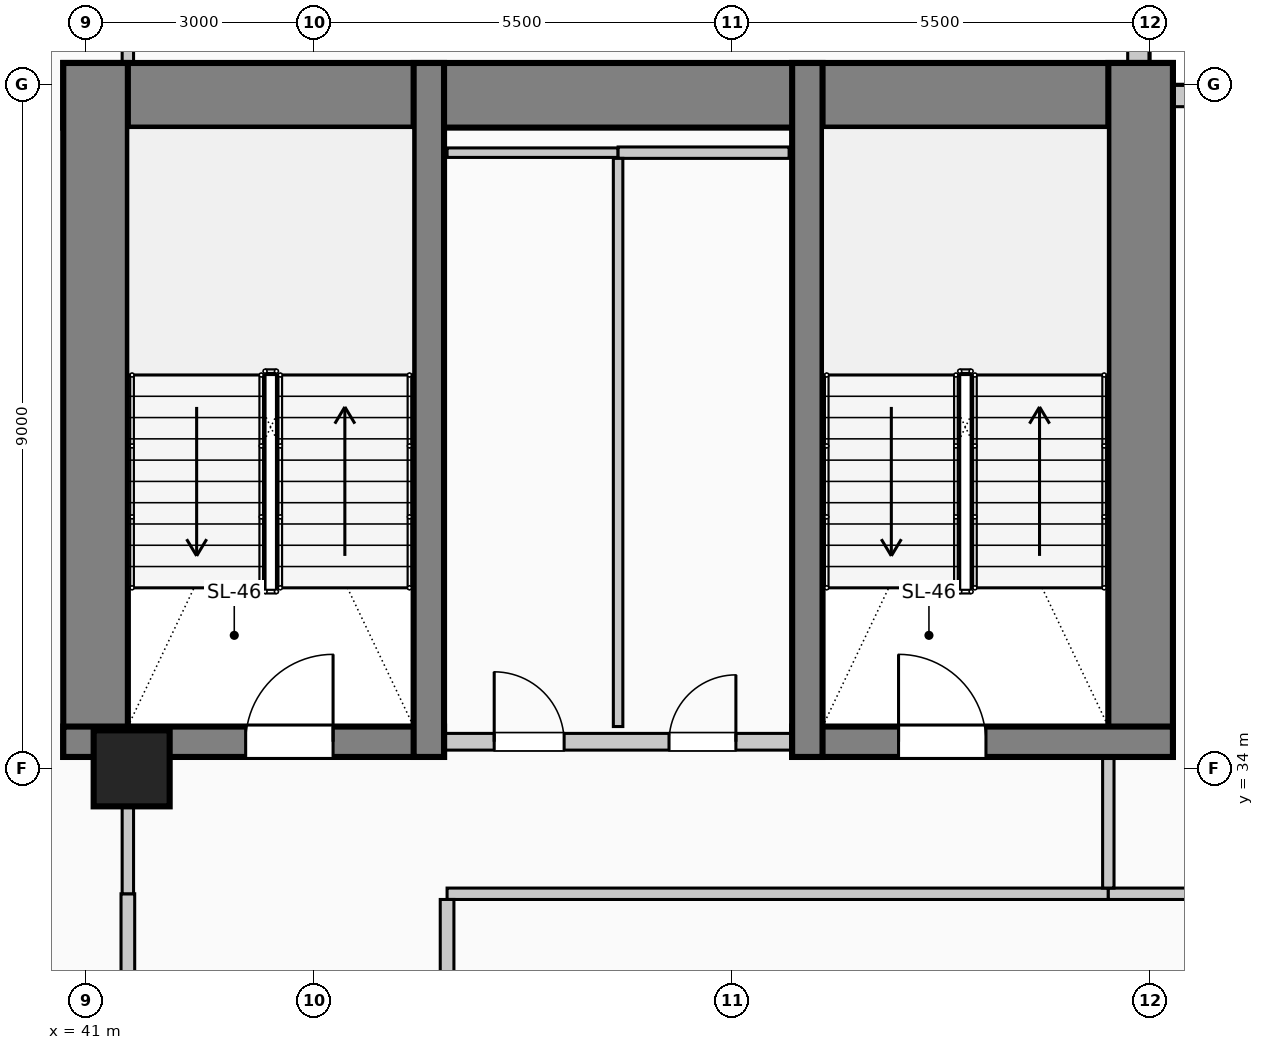
"""IFC4 building model, lengths in metres.
Left out: names, types, materials, properties, quantities, classifications, styles, units other than length and angle.
Written with IfcOpenShell. Run it as: python <this file> out.ifc"""

import sys

from ifc_helpers import new_model, si_unit, direction, frame, frame_2d, origin, origin_2d, place, context, subcontext, project, spatial, rectangle, circle, extrude, element, fill, save


model = new_model("IFC4")
c1 = context("Model", 3, precision=1e-05, world=origin(), true_north=direction((0.0, 1.0)))
c2 = subcontext(c1, "Body", "Model", "MODEL_VIEW")
j1 = project(units=[si_unit("LENGTHUNIT", "METRE"), si_unit("PLANEANGLEUNIT", "RADIAN")], contexts=[c1])
p1 = place(None, origin())
s1 = spatial("IfcSite", under=j1, at=p1, CompositionType="ELEMENT")
p2 = place(p1, origin())
s2 = spatial("IfcBuilding", under=s1, at=p2, CompositionType="ELEMENT")
p3 = place(p2, frame((0.0, 0.0, 92.6)))
s3 = spatial("IfcBuildingStorey", under=s2, at=p3, CompositionType="ELEMENT", Elevation=92.6)
p4 = place(p3, frame((40.7, 42.855, 0.0), z_axis=(0.0, 0.0, 1.0), x_axis=(1.0, 0.0, 0.0)))
e1 = element("IfcWall", 1, at=p4, inside=s3, PredefinedType="SHEAR", context=c2, shape_type="SweptSolid", body=[
    extrude(rectangle(XDim=14.6, YDim=0.85, at=frame_2d((7.3, 0.0))), origin(), (0.0, 0.0, 1.0), 4.0),
])
for number, where, z_axis, x_axis in (
    (2, (41.125, 34.15, 0.0), (0.0, 0.0, 1.0), (0.0, 1.0, 0.0)),
    (3, (54.875, 34.15, 0.0), (0.0, 0.0, 1.0), (0.0, 1.0, 0.0)),
):
    element("IfcWall", number, at=place(p3, frame(where, z_axis=z_axis, x_axis=x_axis)), inside=s3, PredefinedType="SHEAR", context=c2, shape_type="SweptSolid", body=[
        extrude(rectangle(XDim=9.13, YDim=0.85, at=frame_2d((4.565, 0.0))), origin(), (0.0, 0.0, 1.0), 4.0),
    ])
p5 = place(p3, frame((40.7, 34.35, 0.0), z_axis=(0.0, 0.0, 1.0), x_axis=(1.0, 0.0, 0.0)))
e4 = element("IfcWall", 4, at=p5, inside=s3, PredefinedType="SHEAR", context=c2, shape_type="SweptSolid", body=[
    extrude(rectangle(XDim=5.01, YDim=0.4, at=frame_2d((2.505, 0.0))), origin(), (0.0, 0.0, 1.0), 4.0),
])
p6 = place(p5, frame((2.4, 0.0, 0.0)))
e5 = element("IfcOpeningElement", 5, at=p6, cuts=e4, PredefinedType="OPENING", context=c2, shape_type="SweptSolid", body=[
    extrude(rectangle(XDim=1.15, YDim=2.2, at=frame_2d((0.575, 1.1))), frame((0.0, 0.21, 0.0), z_axis=(0.0, -1.0, 0.0), x_axis=(1.0, 0.0, 0.0)), (0.0, 0.0, 1.0), 0.42),
])
p7 = place(p3, frame((45.51, 34.15, 0.0), z_axis=(0.0, 0.0, 1.0), x_axis=(0.0, 1.0, 0.0)))
e6 = element("IfcWall", 6, at=p7, inside=s3, PredefinedType="SHEAR", context=c2, shape_type="SweptSolid", body=[
    extrude(rectangle(XDim=9.13, YDim=0.4, at=frame_2d((4.565, 0.0))), origin(), (0.0, 0.0, 1.0), 4.0),
])
p8 = place(p3, frame((50.29, 34.35, 0.0), z_axis=(0.0, 0.0, 1.0), x_axis=(1.0, 0.0, 0.0)))
e7 = element("IfcWall", 7, at=p8, inside=s3, PredefinedType="SHEAR", context=c2, shape_type="SweptSolid", body=[
    extrude(rectangle(XDim=5.01, YDim=0.4, at=frame_2d((2.505, 0.0))), origin(), (0.0, 0.0, 1.0), 4.0),
])
p9 = place(p8, frame((1.4, 0.0, 0.0)))
e8 = element("IfcOpeningElement", 8, at=p9, cuts=e7, PredefinedType="OPENING", context=c2, shape_type="SweptSolid", body=[
    extrude(rectangle(XDim=1.15, YDim=2.2, at=frame_2d((0.575, 1.1))), frame((0.0, 0.21, 0.0), z_axis=(0.0, -1.0, 0.0), x_axis=(1.0, 0.0, 0.0)), (0.0, 0.0, 1.0), 0.42),
])
p10 = place(p3, frame((50.49, 34.15, 0.0), z_axis=(0.0, 0.0, 1.0), x_axis=(0.0, 1.0, 0.0)))
e9 = element("IfcWall", 9, at=p10, inside=s3, PredefinedType="SHEAR", context=c2, shape_type="SweptSolid", body=[
    extrude(rectangle(XDim=9.13, YDim=0.4, at=frame_2d((4.565, 0.0))), origin(), (0.0, 0.0, 1.0), 4.0),
])
p11 = place(p3, frame((41.6, 34.0, 0.0), z_axis=(0.0, 0.0, 1.0), x_axis=(1.0, 0.0, 0.0)))
e10 = element("IfcColumn", 10, at=p11, inside=s3, PredefinedType="COLUMN", context=c2, shape_type="SweptSolid", body=[
    extrude(circle(Radius=0.5, at=origin_2d()), origin(), (0.0, 0.0, 1.0), 4.0),
])
p12 = place(p3, frame((54.845, 45.4, 0.0), z_axis=(0.0, 0.0, 1.0), x_axis=(0.0, -1.0, 0.0)))
e11 = element("IfcWall", 11, at=p12, inside=s3, PredefinedType="SOLIDWALL", context=c2, shape_type="SweptSolid", body=[
    extrude(rectangle(XDim=2.115, YDim=0.28, at=frame_2d((1.058, 0.0))), origin(), (0.0, 0.0, 1.0), 3.725),
])
p13 = place(p3, frame((55.305, 42.845, 0.0), z_axis=(0.0, 0.0, 1.0), x_axis=(1.0, 0.0, 0.0)))
e12 = element("IfcWall", 12, at=p13, inside=s3, PredefinedType="SOLIDWALL", context=c2, shape_type="SweptSolid", body=[
    extrude(rectangle(XDim=2.095, YDim=0.28, at=frame_2d((1.047, 0.0))), origin(), (0.0, 0.0, 1.0), 3.725),
])
p14 = place(p3, frame((45.72, 34.35, 0.0), z_axis=(0.0, 0.0, 1.0), x_axis=(1.0, 0.0, 0.0)))
e13 = element("IfcWall", 13, at=p14, inside=s3, PredefinedType="PARTITIONING", context=c2, shape_type="SweptSolid", body=[
    extrude(rectangle(XDim=4.56, YDim=0.22, at=frame_2d((2.28, 0.0))), origin(), (0.0, 0.0, 1.0), 3.725),
])
p15 = place(p14, frame((0.65, 0.0, 0.0)))
e14 = element("IfcOpeningElement", 14, at=p15, cuts=e13, PredefinedType="OPENING", context=c2, shape_type="SweptSolid", body=[
    extrude(rectangle(XDim=0.92, YDim=2.1, at=frame_2d((0.46, 1.05))), frame((0.0, 0.12, 0.0), z_axis=(0.0, -1.0, 0.0), x_axis=(1.0, 0.0, 0.0)), (0.0, 0.0, 1.0), 0.24),
])
p16 = place(p14, frame((2.95, 0.0, 0.0)))
e15 = element("IfcOpeningElement", 15, at=p16, cuts=e13, PredefinedType="OPENING", context=c2, shape_type="SweptSolid", body=[
    extrude(rectangle(XDim=0.88, YDim=2.1, at=frame_2d((0.44, 1.05))), frame((0.0, 0.12, 0.0), z_axis=(0.0, -1.0, 0.0), x_axis=(1.0, 0.0, 0.0)), (0.0, 0.0, 1.0), 0.24),
])
p17 = place(p3, frame((45.75, 32.35, 0.0), z_axis=(0.0, 0.0, 1.0), x_axis=(1.0, 0.0, 0.0)))
e16 = element("IfcWall", 16, at=p17, inside=s3, PredefinedType="PARTITIONING", context=c2, shape_type="SweptSolid", body=[
    extrude(rectangle(XDim=8.7, YDim=0.15, at=frame_2d((4.35, 0.0))), origin(), (0.0, 0.0, 1.0), 3.725),
])
p18 = place(p3, frame((54.45, 32.35, 0.0), z_axis=(0.0, 0.0, 1.0), x_axis=(1.0, 0.0, 0.0)))
e17 = element("IfcWall", 17, at=p18, inside=s3, PredefinedType="PARTITIONING", context=c2, shape_type="SweptSolid", body=[
    extrude(rectangle(XDim=2.81, YDim=0.15, at=frame_2d((1.405, 0.0))), origin(), (0.0, 0.0, 1.0), 3.725),
])
p19 = place(p3, frame((45.75, 42.1, 0.0), z_axis=(0.0, 0.0, 1.0), x_axis=(1.0, 0.0, 0.0)))
e18 = element("IfcWall", 18, at=p19, inside=s3, PredefinedType="PARTITIONING", context=c2, shape_type="SweptSolid", body=[
    extrude(rectangle(XDim=2.25, YDim=0.125, at=frame_2d((1.125, 0.0))), origin(), (0.0, 0.0, 1.0), 3.725),
])
p20 = place(p3, frame((48.0, 42.1, 0.0), z_axis=(0.0, 0.0, 1.0), x_axis=(1.0, 0.0, 0.0)))
e19 = element("IfcWall", 19, at=p20, inside=s3, PredefinedType="PARTITIONING", context=c2, shape_type="SweptSolid", body=[
    extrude(rectangle(XDim=2.25, YDim=0.15, at=frame_2d((1.125, 0.0))), origin(), (0.0, 0.0, 1.0), 3.725),
])
p21 = place(p3, frame((41.55, 27.075, 0.0), z_axis=(0.0, 0.0, 1.0), x_axis=(0.0, 1.0, 0.0)))
e20 = element("IfcWall", 20, at=p21, inside=s3, PredefinedType="PARTITIONING", context=c2, shape_type="SweptSolid", body=[
    extrude(rectangle(XDim=5.275, YDim=0.18, at=frame_2d((2.638, 0.0))), origin(), (0.0, 0.0, 1.0), 3.07),
])
p22 = place(p3, frame((41.55, 32.35, 0.0), z_axis=(0.0, 0.0, 1.0), x_axis=(0.0, 1.0, 0.0)))
e21 = element("IfcWall", 21, at=p22, inside=s3, PredefinedType="PARTITIONING", context=c2, shape_type="SweptSolid", body=[
    extrude(rectangle(XDim=1.15, YDim=0.15, at=frame_2d((0.575, 0.0))), origin(), (0.0, 0.0, 1.0), 3.07),
])
p23 = place(p3, frame((41.55, 43.28, 0.0), z_axis=(0.0, 0.0, 1.0), x_axis=(0.0, 1.0, 0.0)))
e22 = element("IfcWall", 22, at=p23, inside=s3, PredefinedType="PARTITIONING", context=c2, shape_type="SweptSolid", body=[
    extrude(rectangle(XDim=1.42, YDim=0.15, at=frame_2d((0.71, 0.0))), origin(), (0.0, 0.0, 1.0), 3.725),
])
p24 = place(p3, frame((45.75, 15.74, 0.0), z_axis=(0.0, 0.0, 1.0), x_axis=(0.0, 1.0, 0.0)))
e23 = element("IfcWall", 23, at=p24, inside=s3, PredefinedType="PARTITIONING", context=c2, shape_type="SweptSolid", body=[
    extrude(rectangle(XDim=16.535, YDim=0.18, at=frame_2d((8.268, 0.0))), origin(), (0.0, 0.0, 1.0), 3.725),
])
p25 = place(p3, frame((48.0, 34.55, 0.0), z_axis=(0.0, 0.0, 1.0), x_axis=(0.0, 1.0, 0.0)))
e24 = element("IfcWall", 24, at=p25, inside=s3, PredefinedType="PARTITIONING", context=c2, shape_type="SweptSolid", body=[
    extrude(rectangle(XDim=7.475, YDim=0.125, at=frame_2d((3.737, 0.0))), origin(), (0.0, 0.0, 1.0), 3.725),
])
p26 = place(p3, frame((54.45, 32.425, 0.0), z_axis=(0.0, 0.0, 1.0), x_axis=(0.0, 1.0, 0.0)))
e25 = element("IfcWall", 25, at=p26, inside=s3, PredefinedType="PARTITIONING", context=c2, shape_type="SweptSolid", body=[
    extrude(rectangle(XDim=1.725, YDim=0.15, at=frame_2d((0.862, 0.0))), origin(), (0.0, 0.0, 1.0), 3.725),
])
p27 = place(p6, origin())
e26 = element("IfcDoor", 26, at=p27, inside=s3, OperationType="SINGLE_SWING_RIGHT", PredefinedType="DOOR", context=c2, shape_type="SweptSolid", body=[
    extrude(rectangle(XDim=1.15, YDim=2.2, at=frame_2d((0.575, 1.1))), frame((0.0, 0.025, 0.0), z_axis=(0.0, -1.0, 0.0), x_axis=(1.0, 0.0, 0.0)), (0.0, 0.0, 1.0), 0.05),
])
fill(e5, e26)
p28 = place(p15, origin())
e27 = element("IfcDoor", 27, at=p28, inside=s3, OperationType="SINGLE_SWING_LEFT", PredefinedType="DOOR", context=c2, shape_type="SweptSolid", body=[
    extrude(rectangle(XDim=0.92, YDim=2.1, at=frame_2d((0.46, 1.05))), frame((0.0, 0.025, 0.0), z_axis=(0.0, -1.0, 0.0), x_axis=(1.0, 0.0, 0.0)), (0.0, 0.0, 1.0), 0.05),
])
fill(e14, e27)
p29 = place(p16, origin())
e28 = element("IfcDoor", 28, at=p29, inside=s3, OperationType="SINGLE_SWING_RIGHT", PredefinedType="DOOR", context=c2, shape_type="SweptSolid", body=[
    extrude(rectangle(XDim=0.88, YDim=2.1, at=frame_2d((0.44, 1.05))), frame((0.0, 0.025, 0.0), z_axis=(0.0, -1.0, 0.0), x_axis=(1.0, 0.0, 0.0)), (0.0, 0.0, 1.0), 0.05),
])
fill(e15, e28)
p30 = place(p9, origin())
e29 = element("IfcDoor", 29, at=p30, inside=s3, OperationType="SINGLE_SWING_LEFT", PredefinedType="DOOR", context=c2, shape_type="SweptSolid", body=[
    extrude(rectangle(XDim=1.15, YDim=2.2, at=frame_2d((0.575, 1.1))), frame((0.0, 0.025, 0.0), z_axis=(0.0, -1.0, 0.0), x_axis=(1.0, 0.0, 0.0)), (0.0, 0.0, 1.0), 0.05),
])
fill(e8, e29)
save(model, sys.argv[1])
